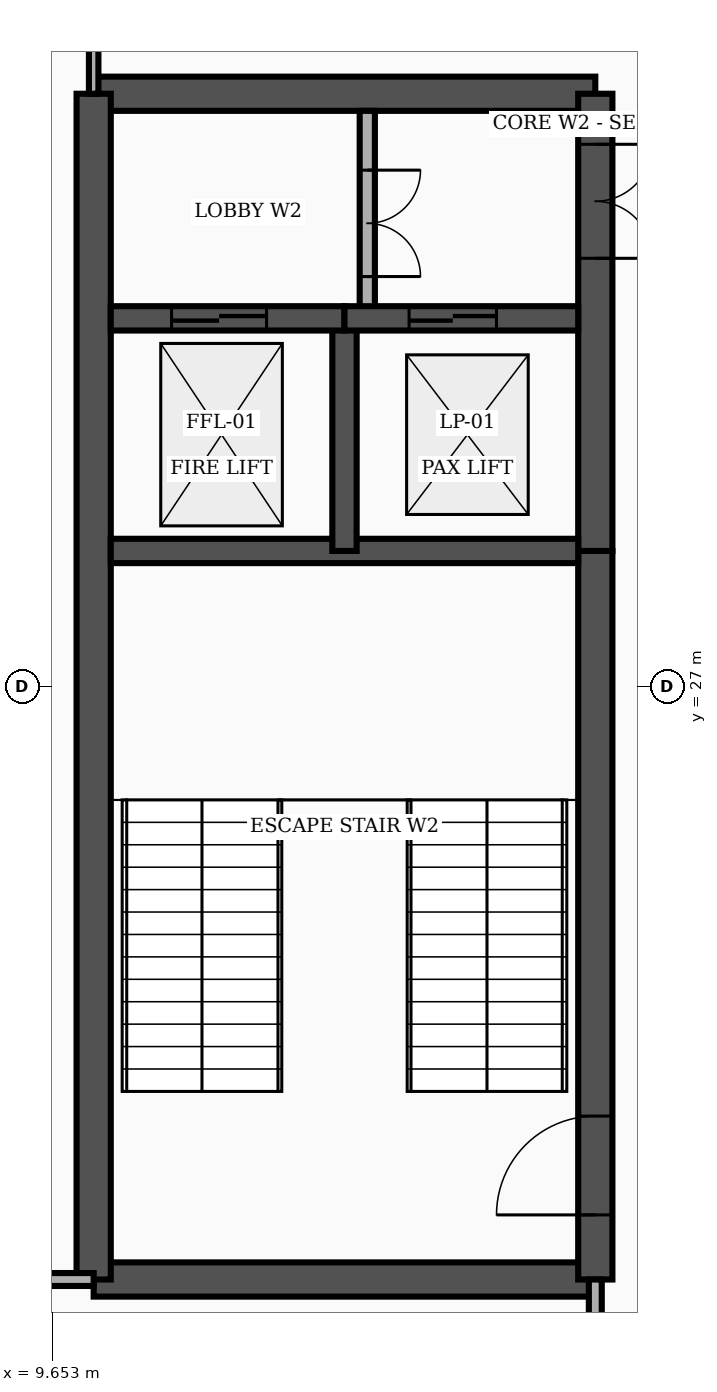
"""IFC4 building model, lengths in metres.
Left out: names, types, materials, properties, quantities, classifications, styles, units other than length and angle.
Written with IfcOpenShell. Run it as: python <this file> out.ifc"""

import sys

from ifc_helpers import new_model, si_unit, direction, frame, frame_2d, origin, place, context, subcontext, project, spatial, rectangle, extrude, element, fill, save


model = new_model("IFC4")
c1 = context("Model", 3, precision=1e-05, world=origin(), true_north=direction((0.0, 1.0)))
c2 = subcontext(c1, "Body", "Model", "MODEL_VIEW")
j1 = project(units=[si_unit("LENGTHUNIT", "METRE"), si_unit("PLANEANGLEUNIT", "RADIAN")], contexts=[c1])
p1 = place(None, origin())
s1 = spatial("IfcSite", under=j1, at=p1, CompositionType="ELEMENT")
p2 = place(p1, origin())
s2 = spatial("IfcBuilding", under=s1, at=p2, CompositionType="ELEMENT")
p3 = place(p2, frame((0.0, 0.0, -4.5)))
s3 = spatial("IfcBuildingStorey", under=s2, at=p3, CompositionType="ELEMENT", Elevation=-4.5)
for number, where, z_axis, x_axis in (
    (1, (10.2, 19.2, 0.0), (0.0, 0.0, 1.0), (1.0, 0.0, 0.0)),
    (2, (10.2, 34.8, 0.0), (0.0, 0.0, 1.0), (1.0, 0.0, 0.0)),
):
    element("IfcWall", number, at=place(p3, frame(where, z_axis=z_axis, x_axis=x_axis)), inside=s3, PredefinedType="SHEAR", context=c2, shape_type="SweptSolid", body=[
        extrude(rectangle(XDim=6.6, YDim=0.45, at=frame_2d((3.3, 0.0))), origin(), (0.0, 0.0, 1.0), 4.24),
    ])
p4 = place(p3, frame((10.2, 19.2, 0.0), z_axis=(0.0, 0.0, 1.0), x_axis=(0.0, 1.0, 0.0)))
e3 = element("IfcWall", 3, at=p4, inside=s3, PredefinedType="SHEAR", context=c2, shape_type="SweptSolid", body=[
    extrude(rectangle(XDim=15.6, YDim=0.45, at=frame_2d((7.8, 0.0))), origin(), (0.0, 0.0, 1.0), 4.24),
])
p5 = place(p3, frame((16.8, 19.2, 0.0), z_axis=(0.0, 0.0, 1.0), x_axis=(0.0, 1.0, 0.0)))
e4 = element("IfcWall", 4, at=p5, inside=s3, PredefinedType="SHEAR", context=c2, shape_type="SweptSolid", body=[
    extrude(rectangle(XDim=9.585, YDim=0.45, at=frame_2d((4.792, 0.0))), origin(), (0.0, 0.0, 1.0), 4.24),
])
p6 = place(p5, frame((0.85, 0.0, 0.0)))
e5 = element("IfcOpeningElement", 5, at=p6, cuts=e4, PredefinedType="OPENING", context=c2, shape_type="SweptSolid", body=[
    extrude(rectangle(XDim=1.3, YDim=2.2, at=frame_2d((0.65, 1.1))), frame((0.0, 0.237, 0.0), z_axis=(0.0, -1.0, 0.0), x_axis=(1.0, 0.0, 0.0)), (0.0, 0.0, 1.0), 0.474),
])
p7 = place(p3, frame((16.8, 28.785, 0.0), z_axis=(0.0, 0.0, 1.0), x_axis=(0.0, 1.0, 0.0)))
e6 = element("IfcWall", 6, at=p7, inside=s3, PredefinedType="SHEAR", context=c2, shape_type="SweptSolid", body=[
    extrude(rectangle(XDim=6.015, YDim=0.45, at=frame_2d((3.008, 0.0))), origin(), (0.0, 0.0, 1.0), 4.24),
])
p8 = place(p7, frame((3.85, 0.0, 0.0)))
e7 = element("IfcOpeningElement", 7, at=p8, cuts=e6, PredefinedType="OPENING", context=c2, shape_type="SweptSolid", body=[
    extrude(rectangle(XDim=1.5, YDim=2.2, at=frame_2d((0.75, 1.1))), frame((0.0, 0.237, 0.0), z_axis=(0.0, -1.0, 0.0), x_axis=(1.0, 0.0, 0.0)), (0.0, 0.0, 1.0), 0.474),
])
p9 = place(p3, frame((10.425, 28.785, 0.0), z_axis=(0.0, 0.0, 1.0), x_axis=(1.0, 0.0, 0.0)))
e8 = element("IfcWall", 8, at=p9, inside=s3, PredefinedType="SHEAR", context=c2, shape_type="SweptSolid", body=[
    extrude(rectangle(XDim=6.15, YDim=0.32, at=frame_2d((3.075, 0.0))), origin(), (0.0, 0.0, 1.0), 4.24),
])
p10 = place(p3, frame((13.5, 28.785, 0.0), z_axis=(0.0, 0.0, 1.0), x_axis=(0.0, 1.0, 0.0)))
e9 = element("IfcWall", 9, at=p10, inside=s3, PredefinedType="SHEAR", context=c2, shape_type="SweptSolid", body=[
    extrude(rectangle(XDim=3.06, YDim=0.32, at=frame_2d((1.53, 0.0))), origin(), (0.0, 0.0, 1.0), 4.24),
])
p11 = place(p3, frame((13.8, 31.845, 0.0), z_axis=(0.0, 0.0, 1.0), x_axis=(0.0, 1.0, 0.0)))
e10 = element("IfcWall", 10, at=p11, inside=s3, PredefinedType="PARTITIONING", context=c2, shape_type="SweptSolid", body=[
    extrude(rectangle(XDim=2.73, YDim=0.2, at=frame_2d((1.365, 0.0))), origin(), (0.0, 0.0, 1.0), 4.24),
])
p12 = place(p11, frame((0.55, 0.0, 0.0)))
e11 = element("IfcOpeningElement", 11, at=p12, cuts=e10, PredefinedType="OPENING", context=c2, shape_type="SweptSolid", body=[
    extrude(rectangle(XDim=1.4, YDim=2.25, at=frame_2d((0.7, 1.125))), frame((0.0, 0.112, 0.0), z_axis=(0.0, -1.0, 0.0), x_axis=(1.0, 0.0, 0.0)), (0.0, 0.0, 1.0), 0.224),
])
p13 = place(p3, frame((10.425, 31.845, 0.0), z_axis=(0.0, 0.0, 1.0), x_axis=(1.0, 0.0, 0.0)))
e12 = element("IfcWall", 12, at=p13, inside=s3, PredefinedType="SHEAR", context=c2, shape_type="SweptSolid", body=[
    extrude(rectangle(XDim=3.075, YDim=0.32, at=frame_2d((1.538, 0.0))), origin(), (0.0, 0.0, 1.0), 4.24),
])
p14 = place(p13, frame((0.8, 0.0, 0.0)))
e13 = element("IfcOpeningElement", 13, at=p14, cuts=e12, PredefinedType="OPENING", context=c2, shape_type="SweptSolid", body=[
    extrude(rectangle(XDim=1.25, YDim=2.25, at=frame_2d((0.625, 1.125))), frame((0.0, 0.172, 0.0), z_axis=(0.0, -1.0, 0.0), x_axis=(1.0, 0.0, 0.0)), (0.0, 0.0, 1.0), 0.344),
])
p15 = place(p3, frame((13.5, 31.845, 0.0), z_axis=(0.0, 0.0, 1.0), x_axis=(1.0, 0.0, 0.0)))
e14 = element("IfcWall", 14, at=p15, inside=s3, PredefinedType="SHEAR", context=c2, shape_type="SweptSolid", body=[
    extrude(rectangle(XDim=3.075, YDim=0.32, at=frame_2d((1.538, 0.0))), origin(), (0.0, 0.0, 1.0), 4.24),
])
p16 = place(p15, frame((0.85, 0.0, 0.0)))
e15 = element("IfcOpeningElement", 15, at=p16, cuts=e14, PredefinedType="OPENING", context=c2, shape_type="SweptSolid", body=[
    extrude(rectangle(XDim=1.15, YDim=2.2, at=frame_2d((0.575, 1.1))), frame((0.0, 0.172, 0.0), z_axis=(0.0, -1.0, 0.0), x_axis=(1.0, 0.0, 0.0)), (0.0, 0.0, 1.0), 0.344),
])
p17 = place(p3, frame((10.2, 34.8, 0.0), z_axis=(0.0, 0.0, 1.0), x_axis=(0.0, 1.0, 0.0)))
e16 = element("IfcWall", 16, at=p17, inside=s3, PredefinedType="PARTITIONING", context=c2, shape_type="SweptSolid", body=[
    extrude(rectangle(XDim=2.0, YDim=0.125, at=frame_2d((1.0, 0.0))), origin(), (0.0, 0.0, 1.0), 4.24),
])
p18 = place(p3, frame((0.21, 19.2, 0.0), z_axis=(0.0, 0.0, 1.0), x_axis=(1.0, 0.0, 0.0)))
e17 = element("IfcWall", 17, at=p18, inside=s3, PredefinedType="PARTITIONING", context=c2, shape_type="SweptSolid", body=[
    extrude(rectangle(XDim=9.99, YDim=0.17, at=frame_2d((4.995, 0.0))), origin(), (0.0, 0.0, 1.0), 4.24),
])
p19 = place(p3, frame((16.8, 0.21, 0.0), z_axis=(0.0, 0.0, 1.0), x_axis=(0.0, 1.0, 0.0)))
e18 = element("IfcWall", 18, at=p19, inside=s3, PredefinedType="PARTITIONING", context=c2, shape_type="SweptSolid", body=[
    extrude(rectangle(XDim=18.99, YDim=0.17, at=frame_2d((9.495, 0.0))), origin(), (0.0, 0.0, 1.0), 4.24),
])
p20 = place(p19, frame((3.3, 0.0, 0.0)))
e19 = element("IfcOpeningElement", 19, at=p20, cuts=e18, PredefinedType="OPENING", context=c2, shape_type="SweptSolid", body=[
    extrude(rectangle(XDim=1.15, YDim=2.15, at=frame_2d((0.575, 1.075))), frame((0.0, 0.097, 0.0), z_axis=(0.0, -1.0, 0.0), x_axis=(1.0, 0.0, 0.0)), (0.0, 0.0, 1.0), 0.194),
])
p21 = place(p6, origin())
e20 = element("IfcDoor", 20, at=p21, inside=s3, OperationType="SINGLE_SWING_LEFT", PredefinedType="DOOR", context=c2, shape_type="SweptSolid", body=[
    extrude(rectangle(XDim=1.3, YDim=2.2, at=frame_2d((0.65, 1.1))), frame((0.0, 0.025, 0.0), z_axis=(0.0, -1.0, 0.0), x_axis=(1.0, 0.0, 0.0)), (0.0, 0.0, 1.0), 0.05),
])
fill(e5, e20)
p22 = place(p8, frame((1.5, 0.0, 0.0), z_axis=(0.0, 0.0, 1.0), x_axis=(-1.0, 0.0, 0.0)))
e21 = element("IfcDoor", 21, at=p22, inside=s3, OperationType="DOUBLE_DOOR_SINGLE_SWING", PredefinedType="DOOR", context=c2, shape_type="SweptSolid", body=[
    extrude(rectangle(XDim=1.5, YDim=2.2, at=frame_2d((0.75, 1.1))), frame((0.0, 0.025, 0.0), z_axis=(0.0, -1.0, 0.0), x_axis=(1.0, 0.0, 0.0)), (0.0, 0.0, 1.0), 0.05),
])
fill(e7, e21)
p23 = place(p12, frame((1.4, 0.0, 0.0), z_axis=(0.0, 0.0, 1.0), x_axis=(-1.0, 0.0, 0.0)))
e22 = element("IfcDoor", 22, at=p23, inside=s3, OperationType="DOUBLE_DOOR_SINGLE_SWING", PredefinedType="DOOR", context=c2, shape_type="SweptSolid", body=[
    extrude(rectangle(XDim=1.4, YDim=2.25, at=frame_2d((0.7, 1.125))), frame((0.0, 0.025, 0.0), z_axis=(0.0, -1.0, 0.0), x_axis=(1.0, 0.0, 0.0)), (0.0, 0.0, 1.0), 0.05),
])
fill(e11, e22)
p24 = place(p14, origin())
e23 = element("IfcDoor", 23, at=p24, inside=s3, OperationType="DOUBLE_DOOR_SLIDING", PredefinedType="DOOR", context=c2, shape_type="SweptSolid", body=[
    extrude(rectangle(XDim=1.25, YDim=2.25, at=frame_2d((0.625, 1.125))), frame((0.0, 0.025, 0.0), z_axis=(0.0, -1.0, 0.0), x_axis=(1.0, 0.0, 0.0)), (0.0, 0.0, 1.0), 0.05),
])
fill(e13, e23)
p25 = place(p16, origin())
e24 = element("IfcDoor", 24, at=p25, inside=s3, OperationType="DOUBLE_DOOR_SLIDING", PredefinedType="DOOR", context=c2, shape_type="SweptSolid", body=[
    extrude(rectangle(XDim=1.15, YDim=2.2, at=frame_2d((0.575, 1.1))), frame((0.0, 0.025, 0.0), z_axis=(0.0, -1.0, 0.0), x_axis=(1.0, 0.0, 0.0)), (0.0, 0.0, 1.0), 0.05),
])
fill(e15, e24)
save(model, sys.argv[1])
